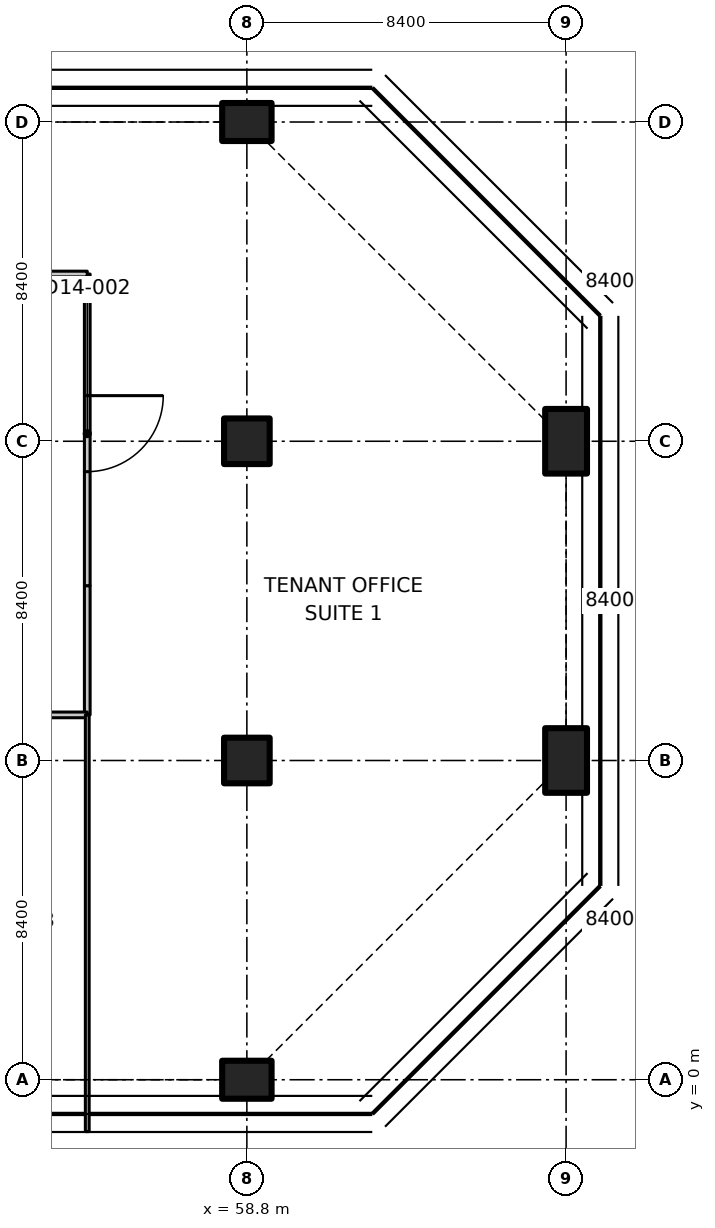
"""IFC4 building model, lengths in metres.
Left out: names, types, materials, properties, quantities, classifications, styles, units other than length and angle.
Written with IfcOpenShell. Run it as: python <this file> out.ifc"""

import sys

from ifc_helpers import new_model, si_unit, direction, frame, frame_2d, origin, origin_2d, place, context, subcontext, project, spatial, polyline, rectangle, outline, extrude, element, fill, save


model = new_model("IFC4")
c1 = context("Model", 3, precision=1e-05, world=origin(), true_north=direction((0.0, 1.0)))
c2 = subcontext(c1, "Body", "Model", "MODEL_VIEW")
j1 = project(units=[si_unit("LENGTHUNIT", "METRE"), si_unit("PLANEANGLEUNIT", "RADIAN")], contexts=[c1])
p1 = place(None, origin())
s1 = spatial("IfcSite", under=j1, at=p1, CompositionType="ELEMENT")
p2 = place(p1, origin())
s2 = spatial("IfcBuilding", under=s1, at=p2, CompositionType="ELEMENT")
p3 = place(p2, frame((0.0, 0.0, 102.5)))
s3 = spatial("IfcBuildingStorey", under=s2, at=p3, CompositionType="ELEMENT", Elevation=102.5)
p4 = place(p3, frame((58.8, 0.0, 0.0), z_axis=(0.0, 0.0, 1.0), x_axis=(0.0, 1.0, 0.0)))
e1 = element("IfcColumn", 1, at=p4, inside=s3, PredefinedType="COLUMN", context=c2, shape_type="SweptSolid", body=[
    extrude(rectangle(XDim=1.0, YDim=1.3, at=origin_2d()), origin(), (0.0, 0.0, 1.0), 3.35),
])
for number, where, z_axis, x_axis in (
    (2, (58.8, 8.4, 0.0), (0.0, 0.0, 1.0), (1.0, 0.0, 0.0)),
    (3, (58.8, 16.8, 0.0), (0.0, 0.0, 1.0), (1.0, 0.0, 0.0)),
):
    element("IfcColumn", number, at=place(p3, frame(where, z_axis=z_axis, x_axis=x_axis)), inside=s3, PredefinedType="COLUMN", context=c2, shape_type="SweptSolid", body=[
        extrude(rectangle(XDim=1.2, YDim=1.2, at=origin_2d()), origin(), (0.0, 0.0, 1.0), 3.35),
    ])
p5 = place(p3, frame((58.8, 25.2, 0.0), z_axis=(0.0, 0.0, 1.0), x_axis=(0.0, 1.0, 0.0)))
e4 = element("IfcColumn", 4, at=p5, inside=s3, PredefinedType="COLUMN", context=c2, shape_type="SweptSolid", body=[
    extrude(rectangle(XDim=1.0, YDim=1.3, at=origin_2d()), origin(), (0.0, 0.0, 1.0), 3.35),
])
for number, where, z_axis, x_axis in (
    (5, (67.2, 8.4, 0.0), (0.0, 0.0, 1.0), (1.0, 0.0, 0.0)),
    (6, (67.2, 16.8, 0.0), (0.0, 0.0, 1.0), (1.0, 0.0, 0.0)),
):
    element("IfcColumn", number, at=place(p3, frame(where, z_axis=z_axis, x_axis=x_axis)), inside=s3, PredefinedType="COLUMN", context=c2, shape_type="SweptSolid", body=[
        extrude(rectangle(XDim=1.1, YDim=1.7, at=origin_2d()), origin(), (0.0, 0.0, 1.0), 3.35),
    ])
p6 = place(p3, frame((54.6, 13.0, 0.0), z_axis=(0.0, 0.0, 1.0), x_axis=(0.0, -1.0, 0.0)))
e7 = element("IfcWall", 7, at=p6, inside=s3, PredefinedType="PARTITIONING", context=c2, shape_type="SweptSolid", body=[
    extrude(rectangle(XDim=3.4, YDim=0.15, at=frame_2d((1.7, 0.0))), origin(), (0.0, 0.0, 1.0), 3.33),
])
p7 = place(p3, frame((54.6, 9.6, 0.0), z_axis=(0.0, 0.0, 1.0), x_axis=(-1.0, 0.0, 0.0)))
e8 = element("IfcWall", 8, at=p7, inside=s3, PredefinedType="PARTITIONING", context=c2, shape_type="SweptSolid", body=[
    extrude(rectangle(XDim=4.2, YDim=0.15, at=frame_2d((2.1, 0.0))), origin(), (0.0, 0.0, 1.0), 3.33),
])
p8 = place(p7, frame((1.5, 0.0, 0.0)))
e9 = element("IfcOpeningElement", 9, at=p8, cuts=e8, PredefinedType="OPENING", context=c2, shape_type="SweptSolid", body=[
    extrude(rectangle(XDim=1.1, YDim=2.1, at=frame_2d((0.55, 1.05))), frame((0.0, 0.085, 0.0), z_axis=(0.0, -1.0, 0.0), x_axis=(1.0, 0.0, 0.0)), (0.0, 0.0, 1.0), 0.17),
])
p9 = place(p3, frame((54.6, 21.2, 0.0), z_axis=(0.0, 0.0, 1.0), x_axis=(0.0, -1.0, 0.0)))
e10 = element("IfcWall", 10, at=p9, inside=s3, PredefinedType="PARTITIONING", context=c2, shape_type="SweptSolid", body=[
    extrude(rectangle(XDim=8.2, YDim=0.15, at=frame_2d((4.1, 0.0))), origin(), (0.0, 0.0, 1.0), 3.33),
])
p10 = place(p9, frame((3.2, 0.0, 0.0)))
e11 = element("IfcOpeningElement", 11, at=p10, cuts=e10, PredefinedType="OPENING", context=c2, shape_type="SweptSolid", body=[
    extrude(rectangle(XDim=2.0, YDim=2.4, at=frame_2d((1.0, 1.2))), frame((0.0, 0.085, 0.0), z_axis=(0.0, -1.0, 0.0), x_axis=(1.0, 0.0, 0.0)), (0.0, 0.0, 1.0), 0.17),
])
p11 = place(p3, frame((54.6, -1.365, 0.0), z_axis=(0.0, 0.0, 1.0), x_axis=(0.0, 1.0, 0.0)))
e12 = element("IfcWall", 12, at=p11, inside=s3, PredefinedType="PARTITIONING", context=c2, shape_type="SweptSolid", body=[
    extrude(outline(polyline([(0.0, 0.0), (10.965, 0.0), (10.965, 3.33), (1.815, 3.33), (1.813, 2.98), (0.917, 2.98), (0.915, 3.33), (0.265, 3.33), (0.0, 3.33), (0.0, 0.0)])), frame((0.0, 0.05, 0.0), z_axis=(0.0, -1.0, 0.0), x_axis=(1.0, 0.0, 0.0)), (0.0, 0.0, 1.0), 0.1),
])
p12 = place(p3, frame((51.0, 21.2, 0.0), z_axis=(0.0, 0.0, 1.0), x_axis=(1.0, 0.0, 0.0)))
e13 = element("IfcWall", 13, at=p12, inside=s3, PredefinedType="PARTITIONING", context=c2, shape_type="SweptSolid", body=[
    extrude(rectangle(XDim=3.6, YDim=0.15, at=frame_2d((1.8, 0.0))), origin(), (0.0, 0.0, 1.0), 3.33),
])
p13 = place(p10, origin())
e14 = element("IfcDoor", 14, at=p13, inside=s3, OperationType="DOUBLE_DOOR_SINGLE_SWING", PredefinedType="DOOR", context=c2, shape_type="SweptSolid", body=[
    extrude(rectangle(XDim=2.0, YDim=2.4, at=frame_2d((1.0, 1.2))), frame((0.0, 0.025, 0.0), z_axis=(0.0, -1.0, 0.0), x_axis=(1.0, 0.0, 0.0)), (0.0, 0.0, 1.0), 0.05),
])
fill(e11, e14)
save(model, sys.argv[1])
